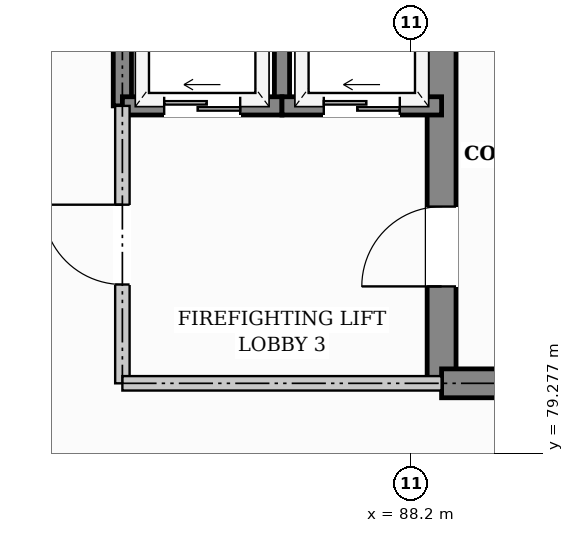
"""IFC4 building model, lengths in metres.
Left out: names, types, materials, properties, quantities, classifications, styles, units other than length and angle.
Written with IfcOpenShell. Run it as: python <this file> out.ifc"""

import sys

from ifc_helpers import new_model, si_unit, direction, frame, frame_2d, origin, place, context, subcontext, project, spatial, rectangle, extrude, element, fill, save


model = new_model("IFC4")
c1 = context("Model", 3, precision=1e-05, world=origin(), true_north=direction((0.0, 1.0)))
c2 = subcontext(c1, "Body", "Model", "MODEL_VIEW")
j1 = project(units=[si_unit("LENGTHUNIT", "METRE"), si_unit("PLANEANGLEUNIT", "RADIAN")], contexts=[c1])
p1 = place(None, origin())
s1 = spatial("IfcSite", under=j1, at=p1, CompositionType="ELEMENT")
p2 = place(p1, origin())
s2 = spatial("IfcBuilding", under=s1, at=p2, CompositionType="ELEMENT")
p3 = place(p2, frame((0.0, 0.0, 16.8)))
s3 = spatial("IfcBuildingStorey", under=s2, at=p3, CompositionType="ELEMENT", Elevation=16.8)
p4 = place(p3, frame((88.6, 80.2, 0.0), z_axis=(0.0, 0.0, 1.0), x_axis=(0.0, 1.0, 0.0)))
e1 = element("IfcWall", 1, at=p4, inside=s3, PredefinedType="SHEAR", context=c2, shape_type="SweptSolid", body=[
    extrude(rectangle(XDim=6.0, YDim=0.38, at=frame_2d((3.0, 0.0))), origin(), (0.0, 0.0, 1.0), 3.34),
])
p5 = place(p4, frame((1.275, 0.0, 0.0)))
e2 = element("IfcOpeningElement", 2, at=p5, cuts=e1, PredefinedType="OPENING", context=c2, shape_type="SweptSolid", body=[
    extrude(rectangle(XDim=1.05, YDim=2.15, at=frame_2d((0.525, 1.075))), frame((0.0, 0.2, 0.0), z_axis=(0.0, -1.0, 0.0), x_axis=(1.0, 0.0, 0.0)), (0.0, 0.0, 1.0), 0.4),
])
p6 = place(p3, frame((88.6, 80.2, 0.0), z_axis=(0.0, 0.0, 1.0), x_axis=(1.0, 0.0, 0.0)))
e3 = element("IfcWall", 3, at=p6, inside=s3, PredefinedType="SHEAR", context=c2, shape_type="SweptSolid", body=[
    extrude(rectangle(XDim=7.0, YDim=0.38, at=frame_2d((3.5, 0.0))), origin(), (0.0, 0.0, 1.0), 3.34),
])
p7 = place(p3, frame((84.4, 83.85, 0.0), z_axis=(0.0, 0.0, 1.0), x_axis=(0.0, 1.0, 0.0)))
e4 = element("IfcWall", 4, at=p7, inside=s3, PredefinedType="SHEAR", context=c2, shape_type="SweptSolid", body=[
    extrude(rectangle(XDim=2.35, YDim=0.24, at=frame_2d((1.175, 0.0))), origin(), (0.0, 0.0, 1.0), 3.34),
])
p8 = place(p3, frame((86.5, 83.85, 0.0), z_axis=(0.0, 0.0, 1.0), x_axis=(0.0, 1.0, 0.0)))
e5 = element("IfcWall", 5, at=p8, inside=s3, PredefinedType="SHEAR", context=c2, shape_type="SweptSolid", body=[
    extrude(rectangle(XDim=2.35, YDim=0.2, at=frame_2d((1.175, 0.0))), origin(), (0.0, 0.0, 1.0), 3.34),
])
p9 = place(p3, frame((84.4, 83.85, 0.0), z_axis=(0.0, 0.0, 1.0), x_axis=(1.0, 0.0, 0.0)))
e6 = element("IfcWall", 6, at=p9, inside=s3, PredefinedType="SHEAR", context=c2, shape_type="SweptSolid", body=[
    extrude(rectangle(XDim=2.1, YDim=0.24, at=frame_2d((1.05, 0.0))), origin(), (0.0, 0.0, 1.0), 3.34),
])
p10 = place(p9, frame((0.55, 0.0, 0.0)))
e7 = element("IfcOpeningElement", 7, at=p10, cuts=e6, PredefinedType="OPENING", context=c2, shape_type="SweptSolid", body=[
    extrude(rectangle(XDim=1.0, YDim=2.1, at=frame_2d((0.5, 1.05))), frame((0.0, 0.13, 0.0), z_axis=(0.0, -1.0, 0.0), x_axis=(1.0, 0.0, 0.0)), (0.0, 0.0, 1.0), 0.26),
])
p11 = place(p3, frame((86.5, 83.85, 0.0), z_axis=(0.0, 0.0, 1.0), x_axis=(1.0, 0.0, 0.0)))
e8 = element("IfcWall", 8, at=p11, inside=s3, PredefinedType="SHEAR", context=c2, shape_type="SweptSolid", body=[
    extrude(rectangle(XDim=2.1, YDim=0.24, at=frame_2d((1.05, 0.0))), origin(), (0.0, 0.0, 1.0), 3.34),
])
p12 = place(p11, frame((0.55, 0.0, 0.0)))
e9 = element("IfcOpeningElement", 9, at=p12, cuts=e8, PredefinedType="OPENING", context=c2, shape_type="SweptSolid", body=[
    extrude(rectangle(XDim=1.0, YDim=2.1, at=frame_2d((0.5, 1.05))), frame((0.0, 0.13, 0.0), z_axis=(0.0, -1.0, 0.0), x_axis=(1.0, 0.0, 0.0)), (0.0, 0.0, 1.0), 0.26),
])
p13 = place(p3, frame((84.4, 80.2, 0.0), z_axis=(0.0, 0.0, 1.0), x_axis=(0.0, 1.0, 0.0)))
e10 = element("IfcWall", 10, at=p13, inside=s3, PredefinedType="PARTITIONING", context=c2, shape_type="SweptSolid", body=[
    extrude(rectangle(XDim=3.65, YDim=0.19, at=frame_2d((1.825, 0.0))), origin(), (0.0, 0.0, 1.0), 3.34),
])
p14 = place(p13, frame((1.3, 0.0, 0.0)))
e11 = element("IfcOpeningElement", 11, at=p14, cuts=e10, PredefinedType="OPENING", context=c2, shape_type="SweptSolid", body=[
    extrude(rectangle(XDim=1.05, YDim=2.15, at=frame_2d((0.525, 1.075))), frame((0.0, 0.105, 0.0), z_axis=(0.0, -1.0, 0.0), x_axis=(1.0, 0.0, 0.0)), (0.0, 0.0, 1.0), 0.21),
])
p15 = place(p3, frame((84.4, 80.2, 0.0), z_axis=(0.0, 0.0, 1.0), x_axis=(1.0, 0.0, 0.0)))
e12 = element("IfcWall", 12, at=p15, inside=s3, PredefinedType="PARTITIONING", context=c2, shape_type="SweptSolid", body=[
    extrude(rectangle(XDim=4.2, YDim=0.19, at=frame_2d((2.1, 0.0))), origin(), (0.0, 0.0, 1.0), 3.34),
])
p16 = place(p5, origin())
e13 = element("IfcDoor", 13, at=p16, inside=s3, OperationType="SINGLE_SWING_LEFT", PredefinedType="DOOR", context=c2, shape_type="SweptSolid", body=[
    extrude(rectangle(XDim=1.05, YDim=2.15, at=frame_2d((0.525, 1.075))), frame((0.0, 0.025, 0.0), z_axis=(0.0, -1.0, 0.0), x_axis=(1.0, 0.0, 0.0)), (0.0, 0.0, 1.0), 0.05),
])
fill(e2, e13)
p17 = place(p10, origin())
e14 = element("IfcDoor", 14, at=p17, inside=s3, OperationType="SLIDING_TO_LEFT", PredefinedType="DOOR", context=c2, shape_type="SweptSolid", body=[
    extrude(rectangle(XDim=1.0, YDim=2.1, at=frame_2d((0.5, 1.05))), frame((0.0, 0.025, 0.0), z_axis=(0.0, -1.0, 0.0), x_axis=(1.0, 0.0, 0.0)), (0.0, 0.0, 1.0), 0.05),
])
fill(e7, e14)
p18 = place(p12, origin())
e15 = element("IfcDoor", 15, at=p18, inside=s3, OperationType="SLIDING_TO_LEFT", PredefinedType="DOOR", context=c2, shape_type="SweptSolid", body=[
    extrude(rectangle(XDim=1.0, YDim=2.1, at=frame_2d((0.5, 1.05))), frame((0.0, 0.025, 0.0), z_axis=(0.0, -1.0, 0.0), x_axis=(1.0, 0.0, 0.0)), (0.0, 0.0, 1.0), 0.05),
])
fill(e9, e15)
p19 = place(p14, origin())
e16 = element("IfcDoor", 16, at=p19, inside=s3, OperationType="SINGLE_SWING_RIGHT", PredefinedType="DOOR", context=c2, shape_type="SweptSolid", body=[
    extrude(rectangle(XDim=1.05, YDim=2.15, at=frame_2d((0.525, 1.075))), frame((0.0, 0.025, 0.0), z_axis=(0.0, -1.0, 0.0), x_axis=(1.0, 0.0, 0.0)), (0.0, 0.0, 1.0), 0.05),
])
fill(e11, e16)
save(model, sys.argv[1])
